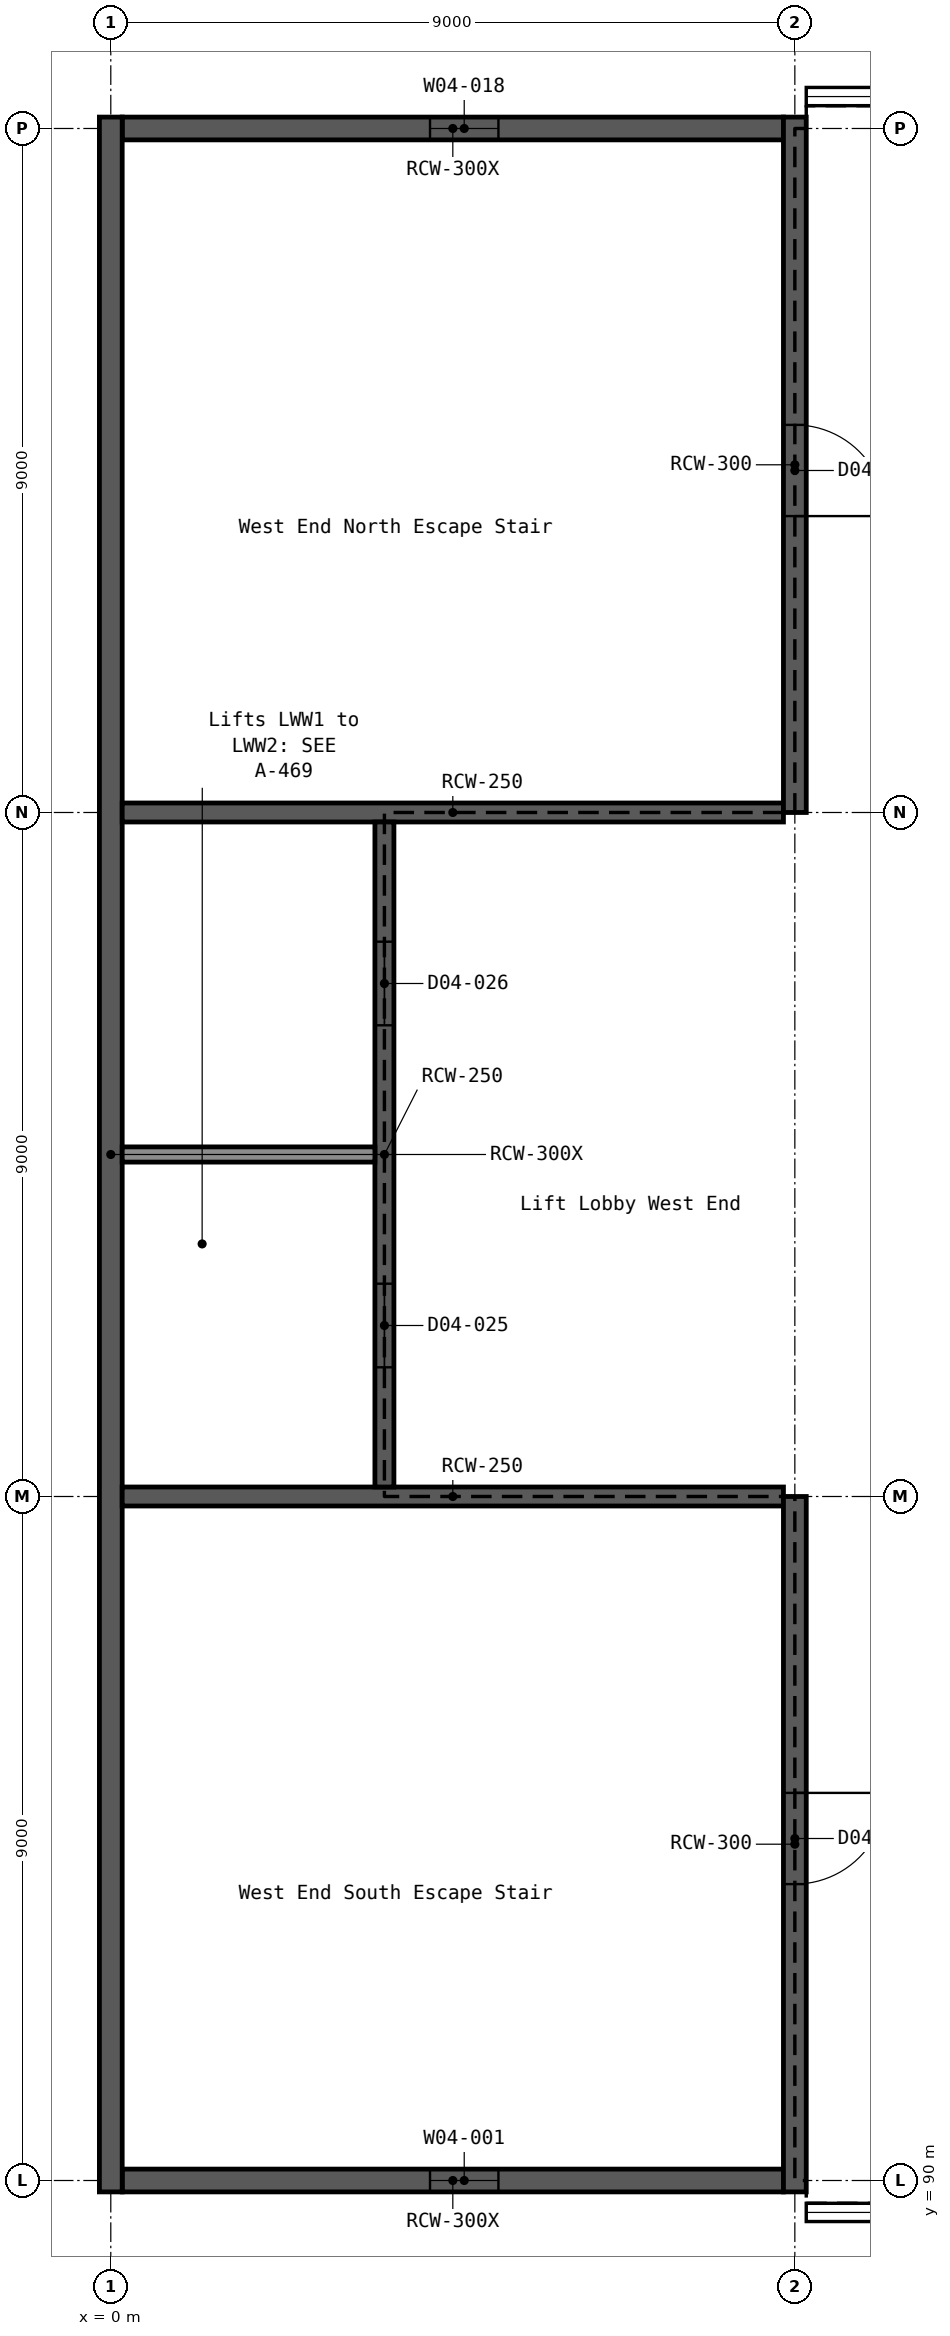
"""IFC4 building model, lengths in metres.
Left out: names, types, materials, properties, quantities, classifications, styles, units other than length and angle.
Written with IfcOpenShell. Run it as: python <this file> out.ifc"""

import sys

from ifc_helpers import new_model, si_unit, direction, frame, frame_2d, origin, place, context, subcontext, project, spatial, rectangle, extrude, element, fill, save


model = new_model("IFC4")
c1 = context("Model", 3, precision=1e-05, world=origin(), true_north=direction((0.0, 1.0)))
c2 = subcontext(c1, "Body", "Model", "MODEL_VIEW")
j1 = project(units=[si_unit("LENGTHUNIT", "METRE"), si_unit("PLANEANGLEUNIT", "RADIAN")], contexts=[c1])
p1 = place(None, origin())
s1 = spatial("IfcSite", under=j1, at=p1, CompositionType="ELEMENT")
p2 = place(p1, origin())
s2 = spatial("IfcBuilding", under=s1, at=p2, CompositionType="ELEMENT")
p3 = place(p2, frame((0.0, 0.0, 21.6)))
s3 = spatial("IfcBuildingStorey", under=s2, at=p3, CompositionType="ELEMENT", Elevation=21.6)
p4 = place(p3, frame((0.15, 90.0, 0.0), z_axis=(0.0, 0.0, 1.0), x_axis=(1.0, 0.0, 0.0)))
e1 = element("IfcWall", 1, at=p4, inside=s3, PredefinedType="SHEAR", context=c2, shape_type="SweptSolid", body=[
    extrude(rectangle(XDim=8.7, YDim=0.3, at=frame_2d((4.35, 0.0))), origin(), (0.0, 0.0, 1.0), 5.4),
])
p5 = place(p4, frame((4.05, 0.0, 1.5)))
e2 = element("IfcOpeningElement", 2, at=p5, cuts=e1, PredefinedType="OPENING", context=c2, shape_type="SweptSolid", body=[
    extrude(rectangle(XDim=0.9, YDim=1.2, at=frame_2d((0.45, 0.6))), frame((0.0, 0.161, 0.0), z_axis=(0.0, -1.0, 0.0), x_axis=(1.0, 0.0, 0.0)), (0.0, 0.0, 1.0), 0.322),
])
p6 = place(p3, frame((0.15, 117.0, 0.0), z_axis=(0.0, 0.0, 1.0), x_axis=(1.0, 0.0, 0.0)))
e3 = element("IfcWall", 3, at=p6, inside=s3, PredefinedType="SHEAR", context=c2, shape_type="SweptSolid", body=[
    extrude(rectangle(XDim=8.7, YDim=0.3, at=frame_2d((4.35, 0.0))), origin(), (0.0, 0.0, 1.0), 5.4),
])
p7 = place(p6, frame((4.05, 0.0, 1.5)))
e4 = element("IfcOpeningElement", 4, at=p7, cuts=e3, PredefinedType="OPENING", context=c2, shape_type="SweptSolid", body=[
    extrude(rectangle(XDim=0.9, YDim=1.2, at=frame_2d((0.45, 0.6))), frame((0.0, 0.161, 0.0), z_axis=(0.0, -1.0, 0.0), x_axis=(1.0, 0.0, 0.0)), (0.0, 0.0, 1.0), 0.322),
])
p8 = place(p3, frame((0.0, 89.85, 0.0), z_axis=(0.0, 0.0, 1.0), x_axis=(0.0, 1.0, 0.0)))
e5 = element("IfcWall", 5, at=p8, inside=s3, PredefinedType="SHEAR", context=c2, shape_type="SweptSolid", body=[
    extrude(rectangle(XDim=27.3, YDim=0.3, at=frame_2d((13.65, 0.0))), origin(), (0.0, 0.0, 1.0), 5.4),
])
for number, where, z_axis, x_axis in (
    (6, (0.15, 99.0, 0.0), (0.0, 0.0, 1.0), (1.0, 0.0, 0.0)),
    (7, (0.15, 108.0, 0.0), (0.0, 0.0, 1.0), (1.0, 0.0, 0.0)),
):
    element("IfcWall", number, at=place(p3, frame(where, z_axis=z_axis, x_axis=x_axis)), inside=s3, PredefinedType="SHEAR", context=c2, shape_type="SweptSolid", body=[
        extrude(rectangle(XDim=8.7, YDim=0.25, at=frame_2d((4.35, 0.0))), origin(), (0.0, 0.0, 1.0), 5.4),
    ])
p9 = place(p3, frame((3.6, 99.125, 0.0), z_axis=(0.0, 0.0, 1.0), x_axis=(0.0, 1.0, 0.0)))
e8 = element("IfcWall", 8, at=p9, inside=s3, PredefinedType="SHEAR", context=c2, shape_type="SweptSolid", body=[
    extrude(rectangle(XDim=8.75, YDim=0.25, at=frame_2d((4.375, 0.0))), origin(), (0.0, 0.0, 1.0), 5.4),
])
p10 = place(p9, frame((1.575, 0.0, 0.0)))
e9 = element("IfcOpeningElement", 9, at=p10, cuts=e8, PredefinedType="OPENING", context=c2, shape_type="SweptSolid", body=[
    extrude(rectangle(XDim=1.1, YDim=2.1, at=frame_2d((0.55, 1.05))), frame((0.0, 0.136, 0.0), z_axis=(0.0, -1.0, 0.0), x_axis=(1.0, 0.0, 0.0)), (0.0, 0.0, 1.0), 0.272),
])
p11 = place(p9, frame((6.075, 0.0, 0.0)))
e10 = element("IfcOpeningElement", 10, at=p11, cuts=e8, PredefinedType="OPENING", context=c2, shape_type="SweptSolid", body=[
    extrude(rectangle(XDim=1.1, YDim=2.1, at=frame_2d((0.55, 1.05))), frame((0.0, 0.136, 0.0), z_axis=(0.0, -1.0, 0.0), x_axis=(1.0, 0.0, 0.0)), (0.0, 0.0, 1.0), 0.272),
])
p12 = place(p3, frame((9.0, 89.85, 0.0), z_axis=(0.0, 0.0, 1.0), x_axis=(0.0, 1.0, 0.0)))
e11 = element("IfcWall", 11, at=p12, inside=s3, PredefinedType="SHEAR", context=c2, shape_type="SweptSolid", body=[
    extrude(rectangle(XDim=9.15, YDim=0.3, at=frame_2d((4.575, 0.0))), origin(), (0.0, 0.0, 1.0), 5.4),
])
p13 = place(p12, frame((4.05, 0.0, 0.0)))
e12 = element("IfcOpeningElement", 12, at=p13, cuts=e11, PredefinedType="OPENING", context=c2, shape_type="SweptSolid", body=[
    extrude(rectangle(XDim=1.2, YDim=2.1, at=frame_2d((0.6, 1.05))), frame((0.0, 0.161, 0.0), z_axis=(0.0, -1.0, 0.0), x_axis=(1.0, 0.0, 0.0)), (0.0, 0.0, 1.0), 0.322),
])
p14 = place(p3, frame((9.0, 108.0, 0.0), z_axis=(0.0, 0.0, 1.0), x_axis=(0.0, 1.0, 0.0)))
e13 = element("IfcWall", 13, at=p14, inside=s3, PredefinedType="SHEAR", context=c2, shape_type="SweptSolid", body=[
    extrude(rectangle(XDim=9.15, YDim=0.3, at=frame_2d((4.575, 0.0))), origin(), (0.0, 0.0, 1.0), 5.4),
])
p15 = place(p14, frame((3.9, 0.0, 0.0)))
e14 = element("IfcOpeningElement", 14, at=p15, cuts=e13, PredefinedType="OPENING", context=c2, shape_type="SweptSolid", body=[
    extrude(rectangle(XDim=1.2, YDim=2.1, at=frame_2d((0.6, 1.05))), frame((0.0, 0.161, 0.0), z_axis=(0.0, -1.0, 0.0), x_axis=(1.0, 0.0, 0.0)), (0.0, 0.0, 1.0), 0.322),
])
p16 = place(p3, frame((0.15, 103.5, 0.0), z_axis=(0.0, 0.0, 1.0), x_axis=(1.0, 0.0, 0.0)))
e15 = element("IfcWall", 15, at=p16, inside=s3, PredefinedType="SOLIDWALL", context=c2, shape_type="SweptSolid", body=[
    extrude(rectangle(XDim=3.325, YDim=0.2, at=frame_2d((1.663, 0.0))), origin(), (0.0, 0.0, 1.0), 5.4),
])
p17 = place(p5, origin())
e16 = element("IfcWindow", 16, at=p17, inside=s3, PartitioningType="SINGLE_PANEL", PredefinedType="WINDOW", context=c2, shape_type="SweptSolid", body=[
    extrude(rectangle(XDim=0.9, YDim=1.2, at=frame_2d((0.45, 0.6))), frame((0.0, 0.03, 0.0), z_axis=(0.0, -1.0, 0.0), x_axis=(1.0, 0.0, 0.0)), (0.0, 0.0, 1.0), 0.06),
])
fill(e2, e16)
p18 = place(p7, origin())
e17 = element("IfcWindow", 17, at=p18, inside=s3, PartitioningType="SINGLE_PANEL", PredefinedType="WINDOW", context=c2, shape_type="SweptSolid", body=[
    extrude(rectangle(XDim=0.9, YDim=1.2, at=frame_2d((0.45, 0.6))), frame((0.0, 0.03, 0.0), z_axis=(0.0, -1.0, 0.0), x_axis=(1.0, 0.0, 0.0)), (0.0, 0.0, 1.0), 0.06),
])
fill(e4, e17)
p19 = place(p13, frame((1.2, 0.0, 0.0), z_axis=(0.0, 0.0, 1.0), x_axis=(-1.0, 0.0, 0.0)))
e18 = element("IfcDoor", 18, at=p19, inside=s3, OperationType="SINGLE_SWING_LEFT", PredefinedType="DOOR", context=c2, shape_type="SweptSolid", body=[
    extrude(rectangle(XDim=1.2, YDim=2.1, at=frame_2d((0.6, 1.05))), frame((0.0, 0.025, 0.0), z_axis=(0.0, -1.0, 0.0), x_axis=(1.0, 0.0, 0.0)), (0.0, 0.0, 1.0), 0.05),
])
fill(e12, e18)
p20 = place(p15, frame((1.2, 0.0, 0.0), z_axis=(0.0, 0.0, 1.0), x_axis=(-1.0, 0.0, 0.0)))
e19 = element("IfcDoor", 19, at=p20, inside=s3, OperationType="SINGLE_SWING_RIGHT", PredefinedType="DOOR", context=c2, shape_type="SweptSolid", body=[
    extrude(rectangle(XDim=1.2, YDim=2.1, at=frame_2d((0.6, 1.05))), frame((0.0, 0.025, 0.0), z_axis=(0.0, -1.0, 0.0), x_axis=(1.0, 0.0, 0.0)), (0.0, 0.0, 1.0), 0.05),
])
fill(e14, e19)
p21 = place(p10, origin())
e20 = element("IfcDoor", 20, at=p21, inside=s3, OperationType="DOUBLE_DOOR_SLIDING", PredefinedType="DOOR", context=c2, shape_type="SweptSolid", body=[
    extrude(rectangle(XDim=1.1, YDim=2.1, at=frame_2d((0.55, 1.05))), frame((0.0, 0.025, 0.0), z_axis=(0.0, -1.0, 0.0), x_axis=(1.0, 0.0, 0.0)), (0.0, 0.0, 1.0), 0.05),
])
fill(e9, e20)
p22 = place(p11, origin())
e21 = element("IfcDoor", 21, at=p22, inside=s3, OperationType="DOUBLE_DOOR_SLIDING", PredefinedType="DOOR", context=c2, shape_type="SweptSolid", body=[
    extrude(rectangle(XDim=1.1, YDim=2.1, at=frame_2d((0.55, 1.05))), frame((0.0, 0.025, 0.0), z_axis=(0.0, -1.0, 0.0), x_axis=(1.0, 0.0, 0.0)), (0.0, 0.0, 1.0), 0.05),
])
fill(e10, e21)
save(model, sys.argv[1])
